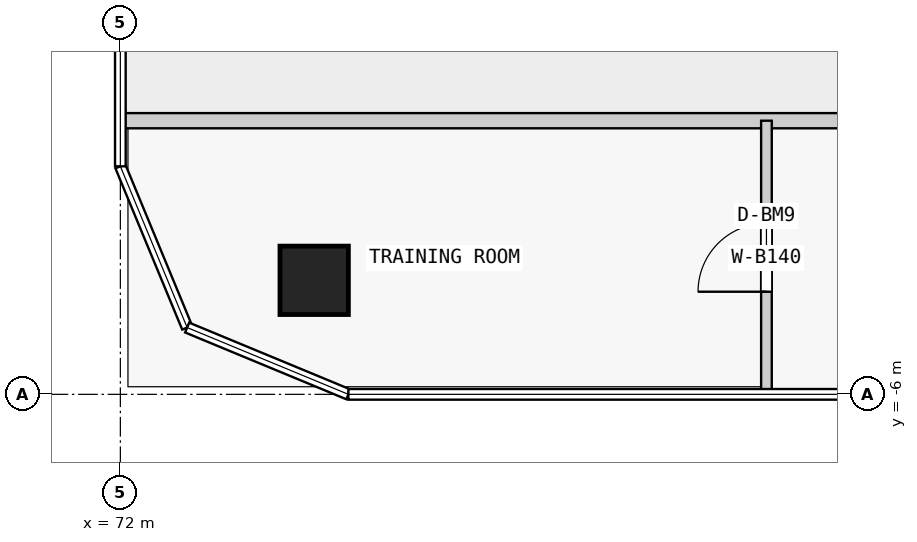
"""IFC4 building model, lengths in metres.
Left out: names, types, materials, properties, quantities, classifications, styles, units other than length and angle.
Written with IfcOpenShell. Run it as: python <this file> out.ifc"""

import sys

from ifc_helpers import new_model, si_unit, direction, frame, frame_2d, origin, origin_2d, place, context, subcontext, project, spatial, rectangle, extrude, element, fill, save


model = new_model("IFC4")
c1 = context("Model", 3, precision=1e-05, world=origin(), true_north=direction((0.0, 1.0)))
c2 = subcontext(c1, "Body", "Model", "MODEL_VIEW")
j1 = project(units=[si_unit("LENGTHUNIT", "METRE"), si_unit("PLANEANGLEUNIT", "RADIAN")], contexts=[c1])
p1 = place(None, origin())
s1 = spatial("IfcSite", under=j1, at=p1, CompositionType="ELEMENT")
p2 = place(p1, origin())
s2 = spatial("IfcBuilding", under=s1, at=p2, CompositionType="ELEMENT")
p3 = place(p2, frame((0.0, 0.0, 47.8)))
s3 = spatial("IfcBuildingStorey", under=s2, at=p3, CompositionType="ELEMENT", Elevation=47.8)
p4 = place(p3, frame((74.55, -4.5, 0.0), z_axis=(0.0, 0.0, 1.0), x_axis=(1.0, 0.0, 0.0)))
e1 = element("IfcColumn", 1, at=p4, inside=s3, PredefinedType="COLUMN", context=c2, shape_type="SweptSolid", body=[
    extrude(rectangle(XDim=0.9, YDim=0.9, at=origin_2d()), origin(), (0.0, 0.0, 1.0), 3.5),
])
p5 = place(p3, frame((72.0, -2.4, 0.0), z_axis=(0.0, 0.0, 1.0), x_axis=(1.0, 0.0, 0.0)))
e2 = element("IfcWall", 2, at=p5, inside=s3, PredefinedType="PARTITIONING", context=c2, shape_type="SweptSolid", body=[
    extrude(rectangle(XDim=20.0, YDim=0.2, at=frame_2d((10.0, 0.0))), origin(), (0.0, 0.0, 1.0), 3.25),
])
p6 = place(p5, frame((11.1, 0.0, 0.0)))
e3 = element("IfcOpeningElement", 3, at=p6, cuts=e2, PredefinedType="OPENING", context=c2, shape_type="SweptSolid", body=[
    extrude(rectangle(XDim=1.8, YDim=2.1, at=frame_2d((0.9, 1.05))), frame((0.0, 0.11, 0.0), z_axis=(0.0, -1.0, 0.0), x_axis=(1.0, 0.0, 0.0)), (0.0, 0.0, 1.0), 0.22),
])
p7 = place(p3, frame((80.5, -6.0, 0.0), z_axis=(0.0, 0.0, 1.0), x_axis=(0.0, 1.0, 0.0)))
e4 = element("IfcWall", 4, at=p7, inside=s3, PredefinedType="PARTITIONING", context=c2, shape_type="SweptSolid", body=[
    extrude(rectangle(XDim=3.6, YDim=0.14, at=frame_2d((1.8, 0.0))), origin(), (0.0, 0.0, 1.0), 3.25),
])
p8 = place(p7, frame((1.35, 0.0, 0.0)))
e5 = element("IfcOpeningElement", 5, at=p8, cuts=e4, PredefinedType="OPENING", context=c2, shape_type="SweptSolid", body=[
    extrude(rectangle(XDim=0.9, YDim=2.4, at=frame_2d((0.45, 1.2))), frame((0.0, 0.08, 0.0), z_axis=(0.0, -1.0, 0.0), x_axis=(1.0, 0.0, 0.0)), (0.0, 0.0, 1.0), 0.16),
])
p9 = place(p8, origin())
e6 = element("IfcDoor", 6, at=p9, inside=s3, OperationType="SINGLE_SWING_LEFT", PredefinedType="DOOR", context=c2, shape_type="SweptSolid", body=[
    extrude(rectangle(XDim=0.9, YDim=2.4, at=frame_2d((0.45, 1.2))), frame((0.0, 0.025, 0.0), z_axis=(0.0, -1.0, 0.0), x_axis=(1.0, 0.0, 0.0)), (0.0, 0.0, 1.0), 0.05),
])
fill(e5, e6)
save(model, sys.argv[1])
